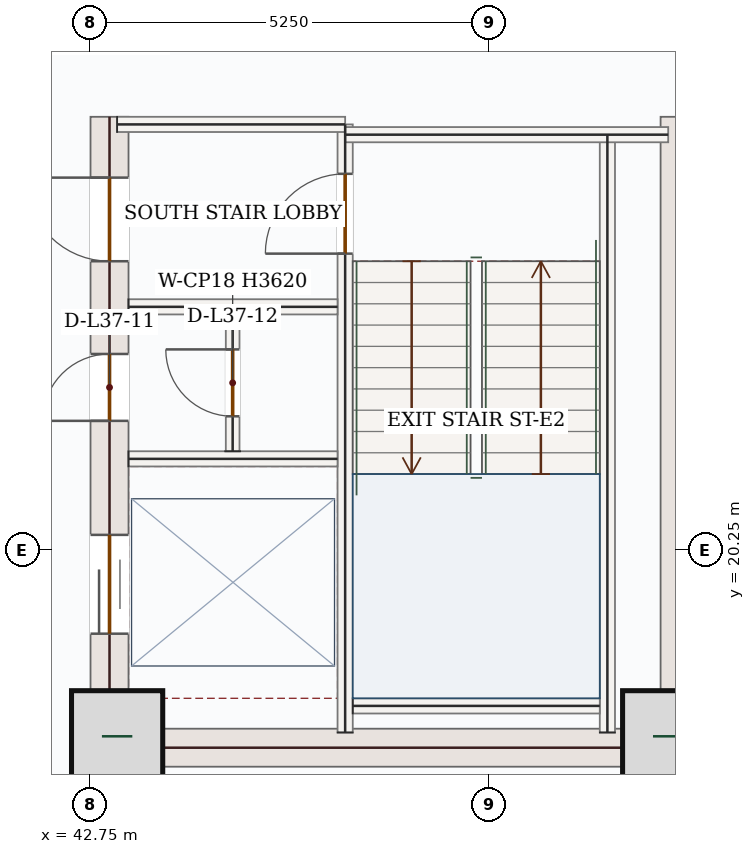
"""IFC4 building model, lengths in metres.
Left out: names, types, materials, properties, quantities, classifications, styles, units other than length and angle.
Written with IfcOpenShell. Run it as: python <this file> out.ifc"""

import sys

from ifc_helpers import new_model, si_unit, direction, frame, frame_2d, origin, origin_2d, place, context, subcontext, project, spatial, rectangle, extrude, source, transform, mapped, element, fill, save


model = new_model("IFC4")
c1 = context("Model", 3, precision=1e-05, world=origin(), true_north=direction((0.0, 1.0)))
c2 = subcontext(c1, "Body", "Model", "MODEL_VIEW")
j1 = project(units=[si_unit("LENGTHUNIT", "METRE"), si_unit("PLANEANGLEUNIT", "RADIAN")], contexts=[c1])
p1 = place(None, origin())
s1 = spatial("IfcSite", under=j1, at=p1, CompositionType="ELEMENT")
p2 = place(p1, origin())
s2 = spatial("IfcBuilding", under=s1, at=p2, CompositionType="ELEMENT")
p3 = place(p2, frame((0.0, 0.0, 162.9)))
s3 = spatial("IfcBuildingStorey", under=s2, at=p3, CompositionType="ELEMENT", Elevation=162.9)
p4 = place(p3, frame((43.0, 17.4, 0.0), z_axis=(0.0, 0.0, 1.0), x_axis=(0.0, 1.0, 0.0)))
e1 = element("IfcWall", 1, at=p4, inside=s3, PredefinedType="SHEAR", context=c2, shape_type="SweptSolid", body=[
    extrude(rectangle(XDim=8.55, YDim=0.5, at=frame_2d((4.275, 0.0))), origin(), (0.0, 0.0, 1.0), 3.62),
])
p5 = place(p4, frame((6.65, 0.0, 0.0)))
e2 = element("IfcOpeningElement", 2, at=p5, cuts=e1, PredefinedType="OPENING", context=c2, shape_type="SweptSolid", body=[
    extrude(rectangle(XDim=1.1, YDim=2.2, at=frame_2d((0.55, 1.1))), frame((0.0, 0.26, 0.0), z_axis=(0.0, -1.0, 0.0), x_axis=(1.0, 0.0, 0.0)), (0.0, 0.0, 1.0), 0.52),
])
p6 = place(p4, frame((1.75, 0.0, 0.0)))
e3 = element("IfcOpeningElement", 3, at=p6, cuts=e1, PredefinedType="OPENING", context=c2, shape_type="SweptSolid", body=[
    extrude(rectangle(XDim=1.3, YDim=2.2, at=frame_2d((0.65, 1.1))), frame((0.0, 0.26, 0.0), z_axis=(0.0, -1.0, 0.0), x_axis=(1.0, 0.0, 0.0)), (0.0, 0.0, 1.0), 0.52),
])
p7 = place(p4, frame((4.55, 0.0, 0.0)))
e4 = element("IfcOpeningElement", 4, at=p7, cuts=e1, PredefinedType="OPENING", context=c2, shape_type="SweptSolid", body=[
    extrude(rectangle(XDim=0.88, YDim=2.1, at=frame_2d((0.44, 1.05))), frame((0.0, 0.26, 0.0), z_axis=(0.0, -1.0, 0.0), x_axis=(1.0, 0.0, 0.0)), (0.0, 0.0, 1.0), 0.52),
])
m1 = source(origin(), c2, "Body", "SweptSolid", [
    extrude(rectangle(XDim=8.55, YDim=0.5, at=frame_2d((4.275, 0.0))), origin(), (0.0, 0.0, 1.0), 3.62),
])
p8 = place(p3, frame((50.5, 17.4, 0.0), z_axis=(0.0, 0.0, 1.0), x_axis=(0.0, 1.0, 0.0)))
e5 = element("IfcWall", 5, at=p8, inside=s3, PredefinedType="SHEAR", context=c2, shape_type="MappedRepresentation", body=[
    mapped(m1, transform((0.0, 0.0, 0.0), x_axis=(1.0, 0.0, 0.0), y_axis=(0.0, 1.0, 0.0), z_axis=(0.0, 0.0, 1.0), scale=1.0)),
])
m2 = source(origin(), c2, "Body", "SweptSolid", [
    extrude(rectangle(XDim=7.0, YDim=0.5, at=frame_2d((3.5, 0.0))), origin(), (0.0, 0.0, 1.0), 3.62),
])
p9 = place(p3, frame((43.25, 17.65, 0.0), z_axis=(0.0, 0.0, 1.0), x_axis=(1.0, 0.0, 0.0)))
e6 = element("IfcWall", 6, at=p9, inside=s3, PredefinedType="SHEAR", context=c2, shape_type="MappedRepresentation", body=[
    mapped(m2, transform((0.0, 0.0, 0.0), x_axis=(1.0, 0.0, 0.0), y_axis=(0.0, 1.0, 0.0), z_axis=(0.0, 0.0, 1.0), scale=1.0)),
])
m3 = source(origin(), c2, "Body", "SweptSolid", [
    extrude(rectangle(XDim=1.2, YDim=1.2, at=origin_2d()), origin(), (0.0, 0.0, 1.0), 3.9),
])
for number, where, z_axis, x_axis in (
    (7, (43.1, 17.8, 0.0), (0.0, 0.0, 1.0), (1.0, 0.0, 0.0)),
    (8, (50.35, 17.8, 0.0), (0.0, 0.0, 1.0), (1.0, 0.0, 0.0)),
):
    element("IfcColumn", number, at=place(p3, frame(where, z_axis=z_axis, x_axis=x_axis)), inside=s3, PredefinedType="COLUMN", context=c2, shape_type="MappedRepresentation", body=[
        mapped(m3, transform((0.0, 0.0, 0.0), x_axis=(1.0, 0.0, 0.0), y_axis=(0.0, 1.0, 0.0), z_axis=(0.0, 0.0, 1.0), scale=1.0)),
    ])
m4 = source(origin(), c2, "Body", "SweptSolid", [
    extrude(rectangle(XDim=5.258, YDim=0.28, at=frame_2d((2.629, 0.0))), origin(), (0.0, 0.0, 1.0), 3.62),
])
p10 = place(p3, frame((53.06, 18.458, 0.0), z_axis=(0.0, 0.0, 1.0), x_axis=(-0.707106781187, -0.707106781187, 0.0)))
e9 = element("IfcWall", 9, at=p10, inside=s3, PredefinedType="SOLIDWALL", context=c2, shape_type="MappedRepresentation", body=[
    mapped(m4, transform((0.0, 0.0, 0.0), x_axis=(1.0, 0.0, 0.0), y_axis=(0.0, 1.0, 0.0), z_axis=(0.0, 0.0, 1.0), scale=1.0)),
])
m5 = source(origin(), c2, "Body", "SweptSolid", [
    extrude(rectangle(XDim=7.87, YDim=0.2, at=frame_2d((3.935, 0.0))), origin(), (0.0, 0.0, 1.0), 3.62),
])
p11 = place(p3, frame((49.55, 17.85, 0.0), z_axis=(0.0, 0.0, 1.0), x_axis=(0.0, 1.0, 0.0)))
e10 = element("IfcWall", 10, at=p11, inside=s3, PredefinedType="SOLIDWALL", context=c2, shape_type="MappedRepresentation", body=[
    mapped(m5, transform((0.0, 0.0, 0.0), x_axis=(1.0, 0.0, 0.0), y_axis=(0.0, 1.0, 0.0), z_axis=(0.0, 0.0, 1.0), scale=1.0)),
])
p12 = place(p3, frame((46.1, 17.85, 0.0), z_axis=(0.0, 0.0, 1.0), x_axis=(0.0, 1.0, 0.0)))
e11 = element("IfcWall", 11, at=p12, inside=s3, PredefinedType="SOLIDWALL", context=c2, shape_type="SweptSolid", body=[
    extrude(rectangle(XDim=8.0, YDim=0.2, at=frame_2d((4.0, 0.0))), origin(), (0.0, 0.0, 1.0), 3.62),
])
p13 = place(p12, frame((6.3, 0.0, 0.0)))
e12 = element("IfcOpeningElement", 12, at=p13, cuts=e11, PredefinedType="OPENING", context=c2, shape_type="SweptSolid", body=[
    extrude(rectangle(XDim=1.05, YDim=2.15, at=frame_2d((0.525, 1.075))), frame((0.0, 0.11, 0.0), z_axis=(0.0, -1.0, 0.0), x_axis=(1.0, 0.0, 0.0)), (0.0, 0.0, 1.0), 0.22),
])
m6 = source(origin(), c2, "Body", "SweptSolid", [
    extrude(rectangle(XDim=3.0, YDim=0.2, at=frame_2d((1.5, 0.0))), origin(), (0.0, 0.0, 1.0), 3.62),
])
p14 = place(p3, frame((43.1, 25.85, 0.0), z_axis=(0.0, 0.0, 1.0), x_axis=(1.0, 0.0, 0.0)))
e13 = element("IfcWall", 13, at=p14, inside=s3, PredefinedType="SOLIDWALL", context=c2, shape_type="MappedRepresentation", body=[
    mapped(m6, transform((0.0, 0.0, 0.0), x_axis=(1.0, 0.0, 0.0), y_axis=(0.0, 1.0, 0.0), z_axis=(0.0, 0.0, 1.0), scale=1.0)),
])
m7 = source(origin(), c2, "Body", "SweptSolid", [
    extrude(rectangle(XDim=4.25, YDim=0.2, at=frame_2d((2.125, 0.0))), origin(), (0.0, 0.0, 1.0), 3.62),
])
p15 = place(p3, frame((46.1, 25.715, 0.0), z_axis=(0.0, 0.0, 1.0), x_axis=(1.0, 0.0, 0.0)))
e14 = element("IfcWall", 14, at=p15, inside=s3, PredefinedType="SOLIDWALL", context=c2, shape_type="MappedRepresentation", body=[
    mapped(m7, transform((0.0, 0.0, 0.0), x_axis=(1.0, 0.0, 0.0), y_axis=(0.0, 1.0, 0.0), z_axis=(0.0, 0.0, 1.0), scale=1.0)),
])
m8 = source(origin(), c2, "Body", "SweptSolid", [
    extrude(rectangle(XDim=3.25, YDim=0.2, at=frame_2d((1.625, 0.0))), origin(), (0.0, 0.0, 1.0), 3.62),
])
p16 = place(p3, frame((46.2, 18.2, 0.0), z_axis=(0.0, 0.0, 1.0), x_axis=(1.0, 0.0, 0.0)))
e15 = element("IfcWall", 15, at=p16, inside=s3, PredefinedType="SOLIDWALL", context=c2, shape_type="MappedRepresentation", body=[
    mapped(m8, transform((0.0, 0.0, 0.0), x_axis=(1.0, 0.0, 0.0), y_axis=(0.0, 1.0, 0.0), z_axis=(0.0, 0.0, 1.0), scale=1.0)),
])
m9 = source(origin(), c2, "Body", "SweptSolid", [
    extrude(rectangle(XDim=2.75, YDim=0.2, at=frame_2d((1.375, 0.0))), origin(), (0.0, 0.0, 1.0), 3.62),
])
for number, where, z_axis, x_axis in (
    (16, (43.25, 23.45, 0.0), (0.0, 0.0, 1.0), (1.0, 0.0, 0.0)),
    (17, (43.25, 21.45, 0.0), (0.0, 0.0, 1.0), (1.0, 0.0, 0.0)),
):
    element("IfcWall", number, at=place(p3, frame(where, z_axis=z_axis, x_axis=x_axis)), inside=s3, PredefinedType="SOLIDWALL", context=c2, shape_type="MappedRepresentation", body=[
        mapped(m9, transform((0.0, 0.0, 0.0), x_axis=(1.0, 0.0, 0.0), y_axis=(0.0, 1.0, 0.0), z_axis=(0.0, 0.0, 1.0), scale=1.0)),
    ])
p17 = place(p3, frame((44.62, 21.55, 0.0), z_axis=(0.0, 0.0, 1.0), x_axis=(0.0, 1.0, 0.0)))
e18 = element("IfcWall", 18, at=p17, inside=s3, PredefinedType="PARTITIONING", context=c2, shape_type="SweptSolid", body=[
    extrude(rectangle(XDim=1.8, YDim=0.18, at=frame_2d((0.9, 0.0))), origin(), (0.0, 0.0, 1.0), 3.62),
])
p18 = place(p17, frame((0.46, 0.0, 0.0)))
e19 = element("IfcOpeningElement", 19, at=p18, cuts=e18, PredefinedType="OPENING", context=c2, shape_type="SweptSolid", body=[
    extrude(rectangle(XDim=0.88, YDim=2.1, at=frame_2d((0.44, 1.05))), frame((0.0, 0.1, 0.0), z_axis=(0.0, -1.0, 0.0), x_axis=(1.0, 0.0, 0.0)), (0.0, 0.0, 1.0), 0.2),
])
m10 = source(origin(), c2, "Body", "SweptSolid", [
    extrude(rectangle(XDim=1.05, YDim=2.15, at=frame_2d((0.525, 1.075))), frame((0.0, 0.025, 0.0), z_axis=(0.0, -1.0, 0.0), x_axis=(1.0, 0.0, 0.0)), (0.0, 0.0, 1.0), 0.05),
])
p19 = place(p13, origin())
e20 = element("IfcDoor", 20, at=p19, inside=s3, OperationType="SINGLE_SWING_LEFT", PredefinedType="DOOR", context=c2, shape_type="MappedRepresentation", body=[
    mapped(m10, transform((0.0, 0.0, 0.0), x_axis=(1.0, 0.0, 0.0), y_axis=(0.0, 1.0, 0.0), z_axis=(0.0, 0.0, 1.0), scale=1.0)),
])
fill(e12, e20)
m11 = source(origin(), c2, "Body", "SweptSolid", [
    extrude(rectangle(XDim=1.1, YDim=2.2, at=frame_2d((0.55, 1.1))), frame((0.0, 0.025, 0.0), z_axis=(0.0, -1.0, 0.0), x_axis=(1.0, 0.0, 0.0)), (0.0, 0.0, 1.0), 0.05),
])
p20 = place(p5, origin())
e21 = element("IfcDoor", 21, at=p20, inside=s3, OperationType="SINGLE_SWING_RIGHT", PredefinedType="DOOR", context=c2, shape_type="MappedRepresentation", body=[
    mapped(m11, transform((0.0, 0.0, 0.0), x_axis=(1.0, 0.0, 0.0), y_axis=(0.0, 1.0, 0.0), z_axis=(0.0, 0.0, 1.0), scale=1.0)),
])
fill(e2, e21)
m12 = source(origin(), c2, "Body", "SweptSolid", [
    extrude(rectangle(XDim=1.3, YDim=2.2, at=frame_2d((0.65, 1.1))), frame((0.0, 0.025, 0.0), z_axis=(0.0, -1.0, 0.0), x_axis=(1.0, 0.0, 0.0)), (0.0, 0.0, 1.0), 0.05),
])
p21 = place(p6, origin())
e22 = element("IfcDoor", 22, at=p21, inside=s3, OperationType="DOUBLE_DOOR_SLIDING", PredefinedType="DOOR", context=c2, shape_type="MappedRepresentation", body=[
    mapped(m12, transform((0.0, 0.0, 0.0), x_axis=(1.0, 0.0, 0.0), y_axis=(0.0, 1.0, 0.0), z_axis=(0.0, 0.0, 1.0), scale=1.0)),
])
fill(e3, e22)
m13 = source(origin(), c2, "Body", "SweptSolid", [
    extrude(rectangle(XDim=0.88, YDim=2.1, at=frame_2d((0.44, 1.05))), frame((0.0, 0.025, 0.0), z_axis=(0.0, -1.0, 0.0), x_axis=(1.0, 0.0, 0.0)), (0.0, 0.0, 1.0), 0.05),
])
p22 = place(p7, origin())
e23 = element("IfcDoor", 23, at=p22, inside=s3, OperationType="SINGLE_SWING_LEFT", PredefinedType="DOOR", context=c2, shape_type="MappedRepresentation", body=[
    mapped(m13, transform((0.0, 0.0, 0.0), x_axis=(1.0, 0.0, 0.0), y_axis=(0.0, 1.0, 0.0), z_axis=(0.0, 0.0, 1.0), scale=1.0)),
])
fill(e4, e23)
p23 = place(p18, origin())
e24 = element("IfcDoor", 24, at=p23, inside=s3, OperationType="SINGLE_SWING_RIGHT", PredefinedType="DOOR", context=c2, shape_type="MappedRepresentation", body=[
    mapped(m13, transform((0.0, 0.0, 0.0), x_axis=(1.0, 0.0, 0.0), y_axis=(0.0, 1.0, 0.0), z_axis=(0.0, 0.0, 1.0), scale=1.0)),
])
fill(e19, e24)
save(model, sys.argv[1])
